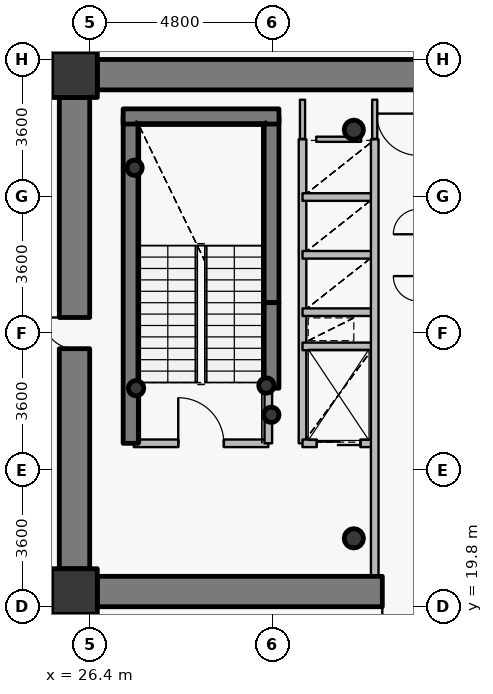
"""IFC4 building model, lengths in metres.
Left out: names, types, materials, properties, quantities, classifications, styles, units other than length and angle.
Written with IfcOpenShell. Run it as: python <this file> out.ifc"""

import sys

from ifc_helpers import new_model, si_unit, direction, frame, frame_2d, origin, origin_2d, place, context, subcontext, project, spatial, rectangle, hollow_circle, extrude, source, transform, mapped, element, fill, save


model = new_model("IFC4")
c1 = context("Model", 3, precision=1e-05, world=origin(), true_north=direction((0.0, 1.0)))
c2 = subcontext(c1, "Body", "Model", "MODEL_VIEW")
j1 = project(units=[si_unit("LENGTHUNIT", "METRE"), si_unit("PLANEANGLEUNIT", "RADIAN")], contexts=[c1])
p1 = place(None, origin())
s1 = spatial("IfcSite", under=j1, at=p1, CompositionType="ELEMENT")
p2 = place(p1, origin())
s2 = spatial("IfcBuilding", under=s1, at=p2, CompositionType="ELEMENT")
p3 = place(p2, frame((0.0, 0.0, 142.2)))
s3 = spatial("IfcBuildingStorey", under=s2, at=p3, CompositionType="ELEMENT", Elevation=142.2)
for number, where, z_axis, x_axis in (
    (1, (26.0, 20.2, 0.0), (0.0, 0.0, 1.0), (1.0, 0.0, 0.0)),
    (2, (26.0, 33.8, 0.0), (0.0, 0.0, 1.0), (1.0, 0.0, 0.0)),
):
    element("IfcColumn", number, at=place(p3, frame(where, z_axis=z_axis, x_axis=x_axis)), inside=s3, PredefinedType="COLUMN", context=c2, shape_type="SweptSolid", body=[
        extrude(rectangle(XDim=1.2, YDim=1.2, at=origin_2d()), origin(), (0.0, 0.0, 1.0), 3.75),
    ])
for number, where, z_axis, x_axis in (
    (3, (33.35, 21.6, 0.0), (0.0, 0.0, 1.0), (1.0, 0.0, 0.0)),
    (4, (33.35, 32.35, 0.0), (0.0, 0.0, 1.0), (1.0, 0.0, 0.0)),
):
    element("IfcColumn", number, at=place(p3, frame(where, z_axis=z_axis, x_axis=x_axis)), inside=s3, PredefinedType="COLUMN", context=c2, shape_type="SweptSolid", body=[
        extrude(hollow_circle(Radius=0.254, WallThickness=0.02, at=origin_2d()), origin(), (0.0, 0.0, 1.0), 3.75),
    ])
p4 = place(p3, frame((27.48, 24.1, 0.0), z_axis=(0.0, 0.0, 1.0), x_axis=(0.0, 1.0, 0.0)))
e5 = element("IfcWall", 5, at=p4, inside=s3, PredefinedType="SHEAR", context=c2, shape_type="SweptSolid", body=[
    extrude(rectangle(XDim=8.6, YDim=0.4, at=frame_2d((4.3, 0.0))), origin(), (0.0, 0.0, 1.0), 3.75),
])
p5 = place(p3, frame((31.18, 27.8, 0.0), z_axis=(0.0, 0.0, 1.0), x_axis=(0.0, 1.0, 0.0)))
e6 = element("IfcWall", 6, at=p5, inside=s3, PredefinedType="SHEAR", context=c2, shape_type="SweptSolid", body=[
    extrude(rectangle(XDim=4.9, YDim=0.4, at=frame_2d((2.45, 0.0))), origin(), (0.0, 0.0, 1.0), 3.75),
])
p6 = place(p3, frame((27.28, 32.7, 0.0), z_axis=(0.0, 0.0, 1.0), x_axis=(1.0, 0.0, 0.0)))
e7 = element("IfcWall", 7, at=p6, inside=s3, PredefinedType="SHEAR", context=c2, shape_type="SweptSolid", body=[
    extrude(rectangle(XDim=4.1, YDim=0.4, at=frame_2d((2.05, 0.0))), origin(), (0.0, 0.0, 1.0), 3.75),
])
for number, where, z_axis, x_axis in (
    (8, (27.58, 31.35, 0.0), (0.0, 0.0, 1.0), (1.0, 0.0, 0.0)),
    (9, (31.05, 25.62, 0.0), (0.0, 0.0, 1.0), (1.0, 0.0, 0.0)),
    (10, (31.18, 24.85, 0.0), (0.0, 0.0, 1.0), (1.0, 0.0, 0.0)),
    (11, (27.62, 25.55, 0.0), (0.0, 0.0, 1.0), (1.0, 0.0, 0.0)),
):
    element("IfcColumn", number, at=place(p3, frame(where, z_axis=z_axis, x_axis=x_axis)), inside=s3, PredefinedType="COLUMN", context=c2, shape_type="SweptSolid", body=[
        extrude(hollow_circle(Radius=0.203, WallThickness=0.016, at=origin_2d()), origin(), (0.0, 0.0, 1.0), 3.75),
    ])
p7 = place(p3, frame((26.6, 33.8, 0.0), z_axis=(0.0, 0.0, 1.0), x_axis=(1.0, 0.0, 0.0)))
e12 = element("IfcWall", 12, at=p7, inside=s3, PredefinedType="SHEAR", context=c2, shape_type="SweptSolid", body=[
    extrude(rectangle(XDim=18.8, YDim=0.8, at=frame_2d((9.4, 0.0))), origin(), (0.0, 0.0, 1.0), 2.9),
])
p8 = place(p3, frame((45.4, 20.2, 0.0), z_axis=(0.0, 0.0, 1.0), x_axis=(-1.0, 0.0, 0.0)))
e13 = element("IfcWall", 13, at=p8, inside=s3, PredefinedType="SHEAR", context=c2, shape_type="SweptSolid", body=[
    extrude(rectangle(XDim=18.8, YDim=0.8, at=frame_2d((9.4, 0.0))), origin(), (0.0, 0.0, 1.0), 2.9),
])
p9 = place(p8, frame((10.15, 0.0, 0.0)))
e14 = element("IfcOpeningElement", 14, at=p9, cuts=e13, PredefinedType="OPENING", context=c2, shape_type="SweptSolid", body=[
    extrude(rectangle(XDim=1.15, YDim=2.15, at=origin_2d()), frame((0.575, 0.41, 1.075), z_axis=(0.0, -1.0, 0.0), x_axis=(1.0, 0.0, 0.0)), (0.0, 0.0, 1.0), 0.82),
])
p10 = place(p3, frame((26.0, 20.8, 0.0), z_axis=(0.0, 0.0, 1.0), x_axis=(0.0, 1.0, 0.0)))
e15 = element("IfcWall", 15, at=p10, inside=s3, PredefinedType="SHEAR", context=c2, shape_type="SweptSolid", body=[
    extrude(rectangle(XDim=12.4, YDim=0.8, at=frame_2d((6.2, 0.0))), origin(), (0.0, 0.0, 1.0), 2.9),
])
p11 = place(p10, frame((5.79, 0.0, 0.0)))
e16 = element("IfcOpeningElement", 16, at=p11, cuts=e15, PredefinedType="OPENING", context=c2, shape_type="SweptSolid", body=[
    extrude(rectangle(XDim=0.82, YDim=2.1, at=origin_2d()), frame((0.41, 0.41, 1.05), z_axis=(0.0, -1.0, 0.0), x_axis=(1.0, 0.0, 0.0)), (0.0, 0.0, 1.0), 0.82),
])
p12 = place(p3, frame((31.18, 25.55, 0.0), z_axis=(0.0, 0.0, 1.0), x_axis=(0.0, 1.0, 0.0)))
e17 = element("IfcWall", 17, at=p12, inside=s3, PredefinedType="SHEAR", context=c2, shape_type="SweptSolid", body=[
    extrude(rectangle(XDim=2.25, YDim=0.4, at=frame_2d((1.125, 0.0))), origin(), (0.0, 0.0, 1.0), 3.05),
])
p13 = place(p3, frame((27.56, 24.1, 0.0), z_axis=(0.0, 0.0, 1.0), x_axis=(1.0, 0.0, 0.0)))
e18 = element("IfcWall", 18, at=p13, inside=s3, PredefinedType="PARTITIONING", context=c2, shape_type="SweptSolid", body=[
    extrude(rectangle(XDim=3.54, YDim=0.2, at=frame_2d((1.77, 0.0))), origin(), (0.0, 0.0, 1.0), 3.45),
])
p14 = place(p13, frame((1.17, 0.0, 0.0)))
e19 = element("IfcOpeningElement", 19, at=p14, cuts=e18, PredefinedType="OPENING", context=c2, shape_type="SweptSolid", body=[
    extrude(rectangle(XDim=1.2, YDim=2.15, at=origin_2d()), frame((0.6, 0.11, 1.075), z_axis=(0.0, -1.0, 0.0), x_axis=(1.0, 0.0, 0.0)), (0.0, 0.0, 1.0), 0.22),
])
p15 = place(p3, frame((31.1, 24.1, 0.0), z_axis=(0.0, 0.0, 1.0), x_axis=(0.0, 1.0, 0.0)))
e20 = element("IfcWall", 20, at=p15, inside=s3, PredefinedType="PARTITIONING", context=c2, shape_type="SweptSolid", body=[
    extrude(rectangle(XDim=1.44, YDim=0.2, at=frame_2d((0.72, 0.0))), origin(), (0.0, 0.0, 1.0), 3.45),
])
p16 = place(p3, frame((32.0, 24.1, 0.0), z_axis=(0.0, 0.0, 1.0), x_axis=(0.0, 1.0, 0.0)))
e21 = element("IfcWall", 21, at=p16, inside=s3, PredefinedType="PARTITIONING", context=c2, shape_type="SweptSolid", body=[
    extrude(rectangle(XDim=8.0, YDim=0.2, at=frame_2d((4.0, 0.0))), origin(), (0.0, 0.0, 1.0), 3.45),
])
p17 = place(p3, frame((32.0, 24.1, 0.0), z_axis=(0.0, 0.0, 1.0), x_axis=(1.0, 0.0, 0.0)))
e22 = element("IfcWall", 22, at=p17, inside=s3, PredefinedType="PARTITIONING", context=c2, shape_type="SweptSolid", body=[
    extrude(rectangle(XDim=1.9, YDim=0.2, at=frame_2d((0.95, 0.0))), origin(), (0.0, 0.0, 1.0), 3.035),
])
p18 = place(p17, frame((0.375, 0.0, 0.0)))
e23 = element("IfcOpeningElement", 23, at=p18, cuts=e22, PredefinedType="OPENING", context=c2, shape_type="SweptSolid", body=[
    extrude(rectangle(XDim=1.15, YDim=2.15, at=origin_2d()), frame((0.575, 0.11, 1.075), z_axis=(0.0, -1.0, 0.0), x_axis=(1.0, 0.0, 0.0)), (0.0, 0.0, 1.0), 0.22),
])
for number, where, z_axis, x_axis in (
    (24, (32.0, 26.65, 0.0), (0.0, 0.0, 1.0), (1.0, 0.0, 0.0)),
    (25, (32.0, 27.55, 0.0), (0.0, 0.0, 1.0), (1.0, 0.0, 0.0)),
    (26, (32.0, 29.06, 0.0), (0.0, 0.0, 1.0), (1.0, 0.0, 0.0)),
    (27, (32.0, 30.58, 0.0), (0.0, 0.0, 1.0), (1.0, 0.0, 0.0)),
):
    element("IfcWall", number, at=place(p3, frame(where, z_axis=z_axis, x_axis=x_axis)), inside=s3, PredefinedType="PARTITIONING", context=c2, shape_type="SweptSolid", body=[
        extrude(rectangle(XDim=1.9, YDim=0.2, at=frame_2d((0.95, 0.0))), origin(), (0.0, 0.0, 1.0), 3.035),
    ])
p19 = place(p3, frame((33.9, 20.6, 0.0), z_axis=(0.0, 0.0, 1.0), x_axis=(0.0, 1.0, 0.0)))
e28 = element("IfcWall", 28, at=p19, inside=s3, PredefinedType="PARTITIONING", context=c2, shape_type="SweptSolid", body=[
    extrude(rectangle(XDim=11.5, YDim=0.2, at=frame_2d((5.75, 0.0))), origin(), (0.0, 0.0, 1.0), 3.035),
])
p20 = place(p3, frame((32.36, 32.1, 0.0), z_axis=(0.0, 0.0, 1.0), x_axis=(1.0, 0.0, 0.0)))
e29 = element("IfcWall", 29, at=p20, inside=s3, PredefinedType="PARTITIONING", context=c2, shape_type="SweptSolid", body=[
    extrude(rectangle(XDim=1.18, YDim=0.135, at=frame_2d((0.59, 0.0))), origin(), (0.0, 0.0, 1.0), 3.035),
])
p21 = place(p3, frame((32.0, 33.14, 0.0), z_axis=(0.0, 0.0, 1.0), x_axis=(0.0, -1.0, 0.0)))
e30 = element("IfcWall", 30, at=p21, inside=s3, PredefinedType="PARTITIONING", context=c2, shape_type="SweptSolid", body=[
    extrude(rectangle(XDim=1.03, YDim=0.135, at=frame_2d((0.515, 0.0))), origin(), (0.0, 0.0, 1.0), 2.985),
])
p22 = place(p3, frame((33.9, 32.11, 0.0), z_axis=(0.0, 0.0, 1.0), x_axis=(0.0, 1.0, 0.0)))
e31 = element("IfcWall", 31, at=p22, inside=s3, PredefinedType="PARTITIONING", context=c2, shape_type="SweptSolid", body=[
    extrude(rectangle(XDim=1.03, YDim=0.135, at=frame_2d((0.515, 0.0))), origin(), (0.0, 0.0, 1.0), 3.035),
])
p23 = place(p3, frame((26.59, 34.2, 0.0), z_axis=(0.0, 0.0, 1.0), x_axis=(-1.0, 0.0, 0.0)))
e32 = element("IfcWall", 32, at=p23, inside=s3, PredefinedType="PARTITIONING", context=c2, shape_type="SweptSolid", body=[
    extrude(rectangle(XDim=0.99, YDim=0.135, at=frame_2d((0.495, 0.0))), origin(), (0.0, 0.0, 1.0), 2.885),
])
p24 = place(p3, frame((25.6, 33.893, 0.0), z_axis=(0.0, 0.0, 1.0), x_axis=(0.0, -1.0, 0.0)))
e33 = element("IfcWall", 33, at=p24, inside=s3, PredefinedType="PARTITIONING", context=c2, shape_type="SweptSolid", body=[
    extrude(rectangle(XDim=0.683, YDim=0.135, at=frame_2d((0.341, 0.0))), origin(), (0.0, 0.0, 1.0), 3.45),
])
p25 = place(p3, frame((25.6, 20.79, 0.0), z_axis=(0.0, 0.0, 1.0), x_axis=(0.0, -1.0, 0.0)))
e34 = element("IfcWall", 34, at=p25, inside=s3, PredefinedType="PARTITIONING", context=c2, shape_type="SweptSolid", body=[
    extrude(rectangle(XDim=0.99, YDim=0.135, at=frame_2d((0.495, 0.0))), origin(), (0.0, 0.0, 1.0), 3.45),
])
p26 = place(p3, frame((25.907, 19.8, 0.0), z_axis=(0.0, 0.0, 1.0), x_axis=(1.0, 0.0, 0.0)))
e35 = element("IfcWall", 35, at=p26, inside=s3, PredefinedType="PARTITIONING", context=c2, shape_type="SweptSolid", body=[
    extrude(rectangle(XDim=0.683, YDim=0.135, at=frame_2d((0.341, 0.0))), origin(), (0.0, 0.0, 1.0), 2.885),
])
m1 = source(origin(), c2, "Body", "SweptSolid", [
    extrude(rectangle(XDim=0.82, YDim=2.1, at=origin_2d()), frame((0.41, 0.025, 1.05), z_axis=(0.0, -1.0, 0.0), x_axis=(1.0, 0.0, 0.0)), (0.0, 0.0, 1.0), 0.05),
])
p27 = place(p11, origin())
e36 = element("IfcDoor", 36, at=p27, inside=s3, OperationType="SINGLE_SWING_RIGHT", PredefinedType="DOOR", context=c2, shape_type="MappedRepresentation", body=[
    mapped(m1, transform((0.0, 0.0, 0.0), x_axis=(1.0, 0.0, 0.0), y_axis=(0.0, 1.0, 0.0), z_axis=(0.0, 0.0, 1.0), scale=1.0)),
])
fill(e16, e36)
m2 = source(origin(), c2, "Body", "SweptSolid", [
    extrude(rectangle(XDim=1.15, YDim=2.15, at=origin_2d()), frame((0.575, 0.025, 1.075), z_axis=(0.0, -1.0, 0.0), x_axis=(1.0, 0.0, 0.0)), (0.0, 0.0, 1.0), 0.05),
])
p28 = place(p9, origin())
e37 = element("IfcDoor", 37, at=p28, inside=s3, OperationType="SINGLE_SWING_RIGHT", PredefinedType="DOOR", context=c2, shape_type="MappedRepresentation", body=[
    mapped(m2, transform((0.0, 0.0, 0.0), x_axis=(1.0, 0.0, 0.0), y_axis=(0.0, 1.0, 0.0), z_axis=(0.0, 0.0, 1.0), scale=1.0)),
])
fill(e14, e37)
m3 = source(origin(), c2, "Body", "SweptSolid", [
    extrude(rectangle(XDim=1.2, YDim=2.15, at=origin_2d()), frame((0.6, 0.025, 1.075), z_axis=(0.0, -1.0, 0.0), x_axis=(1.0, 0.0, 0.0)), (0.0, 0.0, 1.0), 0.05),
])
p29 = place(p14, origin())
e38 = element("IfcDoor", 38, at=p29, inside=s3, OperationType="SINGLE_SWING_LEFT", PredefinedType="DOOR", context=c2, shape_type="MappedRepresentation", body=[
    mapped(m3, transform((0.0, 0.0, 0.0), x_axis=(1.0, 0.0, 0.0), y_axis=(0.0, 1.0, 0.0), z_axis=(0.0, 0.0, 1.0), scale=1.0)),
])
fill(e19, e38)
m4 = source(origin(), c2, "Body", "SweptSolid", [
    extrude(rectangle(XDim=1.15, YDim=2.15, at=origin_2d()), frame((0.575, 0.025, 1.075), z_axis=(0.0, -1.0, 0.0), x_axis=(1.0, 0.0, 0.0)), (0.0, 0.0, 1.0), 0.05),
])
p30 = place(p18, origin())
e39 = element("IfcDoor", 39, at=p30, inside=s3, OperationType="DOUBLE_DOOR_SLIDING", PredefinedType="USERDEFINED", context=c2, shape_type="MappedRepresentation", body=[
    mapped(m4, transform((0.0, 0.0, 0.0), x_axis=(1.0, 0.0, 0.0), y_axis=(0.0, 1.0, 0.0), z_axis=(0.0, 0.0, 1.0), scale=1.0)),
])
fill(e23, e39)
save(model, sys.argv[1])
